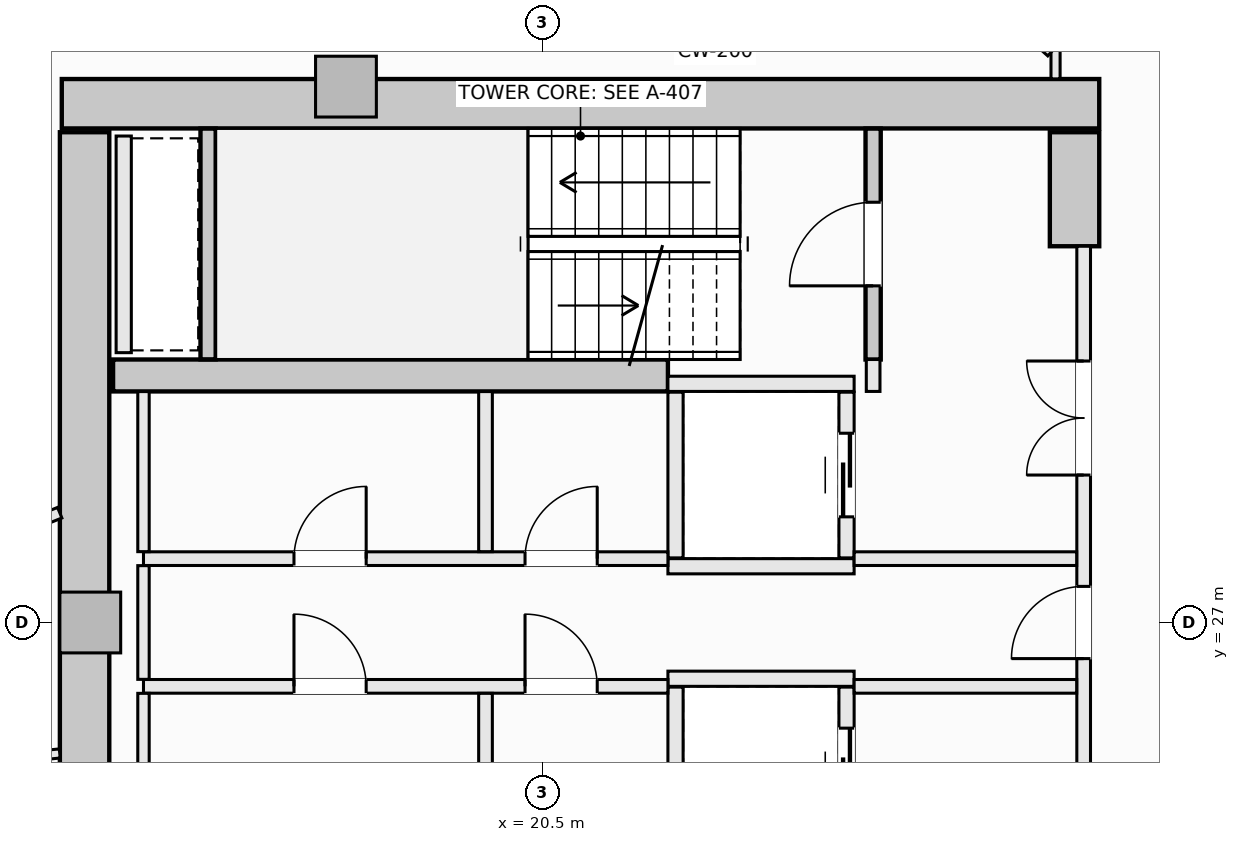
"""IFC4 building model, lengths in metres.
Left out: names, types, materials, properties, quantities, classifications, styles, units other than length and angle.
Written with IfcOpenShell. Run it as: python <this file> out.ifc"""

import sys

from ifc_helpers import new_model, si_unit, direction, frame, frame_2d, origin, origin_2d, place, context, subcontext, project, spatial, rectangle, extrude, element, fill, save


model = new_model("IFC4")
c1 = context("Model", 3, precision=1e-05, world=origin(), true_north=direction((0.0, 1.0)))
c2 = subcontext(c1, "Body", "Model", "MODEL_VIEW")
j1 = project(units=[si_unit("LENGTHUNIT", "METRE"), si_unit("PLANEANGLEUNIT", "RADIAN")], contexts=[c1])
p1 = place(None, origin())
s1 = spatial("IfcSite", under=j1, at=p1, CompositionType="ELEMENT")
p2 = place(p1, origin())
s2 = spatial("IfcBuilding", under=s1, at=p2, CompositionType="ELEMENT")
p3 = place(p2, frame((0.0, 0.0, 146.1)))
s3 = spatial("IfcBuildingStorey", under=s2, at=p3, CompositionType="ELEMENT", Elevation=146.1)
p4 = place(p3, frame((14.175, 33.825, -0.27), z_axis=(0.0, 0.0, 1.0), x_axis=(1.0, 0.0, 0.0)))
e1 = element("IfcWall", 1, at=p4, inside=s3, PredefinedType="SHEAR", context=c2, shape_type="SweptSolid", body=[
    extrude(rectangle(XDim=13.65, YDim=0.65, at=frame_2d((6.825, 0.0))), origin(), (0.0, 0.0, 1.0), 3.4),
])
p5 = place(p3, frame((14.475, 20.55, -0.27), z_axis=(0.0, 0.0, 1.0), x_axis=(0.0, 1.0, 0.0)))
e2 = element("IfcWall", 2, at=p5, inside=s3, PredefinedType="SHEAR", context=c2, shape_type="SweptSolid", body=[
    extrude(rectangle(XDim=12.9, YDim=0.65, at=frame_2d((6.45, 0.0))), origin(), (0.0, 0.0, 1.0), 3.4),
])
p6 = place(p3, frame((27.5, 31.95, -0.27), z_axis=(0.0, 0.0, 1.0), x_axis=(0.0, 1.0, 0.0)))
e3 = element("IfcWall", 3, at=p6, inside=s3, PredefinedType="SHEAR", context=c2, shape_type="SweptSolid", body=[
    extrude(rectangle(XDim=1.5, YDim=0.65, at=frame_2d((0.75, 0.0))), origin(), (0.0, 0.0, 1.0), 3.4),
])
p7 = place(p3, frame((14.85, 30.25, -0.27), z_axis=(0.0, 0.0, 1.0), x_axis=(1.0, 0.0, 0.0)))
e4 = element("IfcWall", 4, at=p7, inside=s3, PredefinedType="SHEAR", context=c2, shape_type="SweptSolid", body=[
    extrude(rectangle(XDim=7.3, YDim=0.42, at=frame_2d((3.65, 0.0))), origin(), (0.0, 0.0, 1.0), 3.4),
])
for number, where, z_axis, x_axis in (
    (5, (17.914, 34.05, -0.27), (0.0, 0.0, 1.0), (1.0, 0.0, 0.0)),
    (6, (14.55, 27.0, -0.27), (0.0, 0.0, 1.0), (1.0, 0.0, 0.0)),
):
    element("IfcColumn", number, at=place(p3, frame(where, z_axis=z_axis, x_axis=x_axis)), inside=s3, PredefinedType="PILASTER", context=c2, shape_type="SweptSolid", body=[
        extrude(rectangle(XDim=0.8, YDim=0.8, at=origin_2d()), origin(), (0.0, 0.0, 1.0), 3.4),
    ])
p8 = place(p3, frame((24.85, 30.46, -0.27), z_axis=(0.0, 0.0, 1.0), x_axis=(0.0, 1.0, 0.0)))
e7 = element("IfcWall", 7, at=p8, inside=s3, PredefinedType="SHEAR", context=c2, shape_type="SweptSolid", body=[
    extrude(rectangle(XDim=3.038, YDim=0.2, at=frame_2d((1.519, 0.0))), origin(), (0.0, 0.0, 1.0), 3.4),
])
p9 = place(p8, frame((0.969, 0.0, 0.27)))
e8 = element("IfcOpeningElement", 8, at=p9, cuts=e7, PredefinedType="OPENING", context=c2, shape_type="SweptSolid", body=[
    extrude(rectangle(XDim=1.1, YDim=2.15, at=frame_2d((0.55, 1.075))), frame((0.0, 0.11, 0.0), z_axis=(0.0, -1.0, 0.0), x_axis=(1.0, 0.0, 0.0)), (0.0, 0.0, 1.0), 0.22),
])
p10 = place(p3, frame((16.1, 30.462, -0.27), z_axis=(0.0, 0.0, 1.0), x_axis=(0.0, 1.0, 0.0)))
e9 = element("IfcWall", 9, at=p10, inside=s3, PredefinedType="SHEAR", context=c2, shape_type="SweptSolid", body=[
    extrude(rectangle(XDim=3.036, YDim=0.2, at=frame_2d((1.518, 0.0))), origin(), (0.0, 0.0, 1.0), 3.4),
])
for number, where, z_axis, x_axis in (
    (10, (22.15, 30.14, 0.0), (0.0, 0.0, 1.0), (1.0, 0.0, 0.0)),
    (11, (22.15, 27.74, 0.0), (0.0, 0.0, 1.0), (1.0, 0.0, 0.0)),
):
    element("IfcWall", number, at=place(p3, frame(where, z_axis=z_axis, x_axis=x_axis)), inside=s3, PredefinedType="SOLIDWALL", context=c2, shape_type="SweptSolid", body=[
        extrude(rectangle(XDim=2.45, YDim=0.2, at=frame_2d((1.225, 0.0))), origin(), (0.0, 0.0, 1.0), 3.13),
    ])
p11 = place(p3, frame((22.25, 27.85, 0.0), z_axis=(0.0, 0.0, 1.0), x_axis=(0.0, 1.0, 0.0)))
e12 = element("IfcWall", 12, at=p11, inside=s3, PredefinedType="SOLIDWALL", context=c2, shape_type="SweptSolid", body=[
    extrude(rectangle(XDim=2.18, YDim=0.2, at=frame_2d((1.09, 0.0))), origin(), (0.0, 0.0, 1.0), 3.13),
])
p12 = place(p3, frame((24.5, 27.85, 0.0), z_axis=(0.0, 0.0, 1.0), x_axis=(0.0, 1.0, 0.0)))
e13 = element("IfcWall", 13, at=p12, inside=s3, PredefinedType="SOLIDWALL", context=c2, shape_type="SweptSolid", body=[
    extrude(rectangle(XDim=2.18, YDim=0.2, at=frame_2d((1.09, 0.0))), origin(), (0.0, 0.0, 1.0), 3.13),
])
p13 = place(p12, frame((0.54, 0.0, 0.0)))
e14 = element("IfcOpeningElement", 14, at=p13, cuts=e13, PredefinedType="OPENING", context=c2, shape_type="SweptSolid", body=[
    extrude(rectangle(XDim=1.1, YDim=2.2, at=frame_2d((0.55, 1.1))), frame((0.0, 0.11, 0.0), z_axis=(0.0, -1.0, 0.0), x_axis=(1.0, 0.0, 0.0)), (0.0, 0.0, 1.0), 0.22),
])
p14 = place(p3, frame((22.15, 26.26, 0.0), z_axis=(0.0, 0.0, 1.0), x_axis=(1.0, 0.0, 0.0)))
e15 = element("IfcWall", 15, at=p14, inside=s3, PredefinedType="SOLIDWALL", context=c2, shape_type="SweptSolid", body=[
    extrude(rectangle(XDim=2.45, YDim=0.2, at=frame_2d((1.225, 0.0))), origin(), (0.0, 0.0, 1.0), 3.13),
])
p15 = place(p3, frame((22.25, 23.97, 0.0), z_axis=(0.0, 0.0, 1.0), x_axis=(0.0, 1.0, 0.0)))
e16 = element("IfcWall", 16, at=p15, inside=s3, PredefinedType="SOLIDWALL", context=c2, shape_type="SweptSolid", body=[
    extrude(rectangle(XDim=2.18, YDim=0.2, at=frame_2d((1.09, 0.0))), origin(), (0.0, 0.0, 1.0), 3.13),
])
p16 = place(p3, frame((24.5, 23.97, 0.0), z_axis=(0.0, 0.0, 1.0), x_axis=(0.0, 1.0, 0.0)))
e17 = element("IfcWall", 17, at=p16, inside=s3, PredefinedType="SOLIDWALL", context=c2, shape_type="SweptSolid", body=[
    extrude(rectangle(XDim=2.18, YDim=0.2, at=frame_2d((1.09, 0.0))), origin(), (0.0, 0.0, 1.0), 3.13),
])
p17 = place(p16, frame((0.54, 0.0, 0.0)))
e18 = element("IfcOpeningElement", 18, at=p17, cuts=e17, PredefinedType="OPENING", context=c2, shape_type="SweptSolid", body=[
    extrude(rectangle(XDim=1.1, YDim=2.2, at=frame_2d((0.55, 1.1))), frame((0.0, 0.11, 0.0), z_axis=(0.0, -1.0, 0.0), x_axis=(1.0, 0.0, 0.0)), (0.0, 0.0, 1.0), 0.22),
])
p18 = place(p3, frame((14.99, 30.55, 0.0), z_axis=(0.0, 0.0, 1.0), x_axis=(0.0, 1.0, 0.0)))
e19 = element("IfcWall", 19, at=p18, inside=s3, PredefinedType="SOLIDWALL", context=c2, shape_type="SweptSolid", body=[
    extrude(rectangle(XDim=2.85, YDim=0.2, at=frame_2d((1.425, 0.0))), origin(), (0.0, 0.0, 1.0), 3.13),
])
p19 = place(p3, frame((24.85, 30.04, 0.0), z_axis=(0.0, 0.0, 1.0), x_axis=(0.0, 1.0, 0.0)))
e20 = element("IfcWall", 20, at=p19, inside=s3, PredefinedType="SOLIDWALL", context=c2, shape_type="SweptSolid", body=[
    extrude(rectangle(XDim=0.42, YDim=0.18, at=frame_2d((0.21, 0.0))), origin(), (0.0, 0.0, 1.0), 3.13),
])
p20 = place(p3, frame((27.62, 22.05, 0.0), z_axis=(0.0, 0.0, 1.0), x_axis=(0.0, 1.0, 0.0)))
e21 = element("IfcWall", 21, at=p20, inside=s3, PredefinedType="SOLIDWALL", context=c2, shape_type="SweptSolid", body=[
    extrude(rectangle(XDim=9.9, YDim=0.18, at=frame_2d((4.95, 0.0))), origin(), (0.0, 0.0, 1.0), 3.13),
])
p21 = place(p20, frame((4.475, 0.0, 0.0)))
e22 = element("IfcOpeningElement", 22, at=p21, cuts=e21, PredefinedType="OPENING", context=c2, shape_type="SweptSolid", body=[
    extrude(rectangle(XDim=0.95, YDim=2.1, at=frame_2d((0.475, 1.05))), frame((0.0, 0.1, 0.0), z_axis=(0.0, -1.0, 0.0), x_axis=(1.0, 0.0, 0.0)), (0.0, 0.0, 1.0), 0.2),
])
p22 = place(p20, frame((6.89, 0.0, 0.0)))
e23 = element("IfcOpeningElement", 23, at=p22, cuts=e21, PredefinedType="OPENING", context=c2, shape_type="SweptSolid", body=[
    extrude(rectangle(XDim=1.5, YDim=2.2, at=frame_2d((0.75, 1.1))), frame((0.0, 0.1, 0.0), z_axis=(0.0, -1.0, 0.0), x_axis=(1.0, 0.0, 0.0)), (0.0, 0.0, 1.0), 0.2),
])
p23 = place(p20, frame((1.51, 0.0, 0.0)))
e24 = element("IfcOpeningElement", 24, at=p23, cuts=e21, PredefinedType="OPENING", context=c2, shape_type="SweptSolid", body=[
    extrude(rectangle(XDim=1.5, YDim=2.2, at=frame_2d((0.75, 1.1))), frame((0.0, 0.1, 0.0), z_axis=(0.0, -1.0, 0.0), x_axis=(1.0, 0.0, 0.0)), (0.0, 0.0, 1.0), 0.2),
])
p24 = place(p3, frame((15.25, 27.84, 0.0), z_axis=(0.0, 0.0, 1.0), x_axis=(1.0, 0.0, 0.0)))
e25 = element("IfcWall", 25, at=p24, inside=s3, PredefinedType="SOLIDWALL", context=c2, shape_type="SweptSolid", body=[
    extrude(rectangle(XDim=6.9, YDim=0.18, at=frame_2d((3.45, 0.0))), origin(), (0.0, 0.0, 1.0), 3.13),
])
p25 = place(p24, frame((5.02, 0.0, 0.0)))
e26 = element("IfcOpeningElement", 26, at=p25, cuts=e25, PredefinedType="OPENING", context=c2, shape_type="SweptSolid", body=[
    extrude(rectangle(XDim=0.95, YDim=2.1, at=frame_2d((0.475, 1.05))), frame((0.0, 0.1, 0.0), z_axis=(0.0, -1.0, 0.0), x_axis=(1.0, 0.0, 0.0)), (0.0, 0.0, 1.0), 0.2),
])
p26 = place(p24, frame((1.98, 0.0, 0.0)))
e27 = element("IfcOpeningElement", 27, at=p26, cuts=e25, PredefinedType="OPENING", context=c2, shape_type="SweptSolid", body=[
    extrude(rectangle(XDim=0.95, YDim=2.1, at=frame_2d((0.475, 1.05))), frame((0.0, 0.1, 0.0), z_axis=(0.0, -1.0, 0.0), x_axis=(1.0, 0.0, 0.0)), (0.0, 0.0, 1.0), 0.2),
])
p27 = place(p3, frame((24.6, 27.84, 0.0), z_axis=(0.0, 0.0, 1.0), x_axis=(1.0, 0.0, 0.0)))
e28 = element("IfcWall", 28, at=p27, inside=s3, PredefinedType="SOLIDWALL", context=c2, shape_type="SweptSolid", body=[
    extrude(rectangle(XDim=2.928, YDim=0.18, at=frame_2d((1.464, 0.0))), origin(), (0.0, 0.0, 1.0), 3.13),
])
p28 = place(p3, frame((15.25, 26.16, 0.0), z_axis=(0.0, 0.0, 1.0), x_axis=(1.0, 0.0, 0.0)))
e29 = element("IfcWall", 29, at=p28, inside=s3, PredefinedType="SOLIDWALL", context=c2, shape_type="SweptSolid", body=[
    extrude(rectangle(XDim=6.9, YDim=0.18, at=frame_2d((3.45, 0.0))), origin(), (0.0, 0.0, 1.0), 3.13),
])
p29 = place(p28, frame((5.02, 0.0, 0.0)))
e30 = element("IfcOpeningElement", 30, at=p29, cuts=e29, PredefinedType="OPENING", context=c2, shape_type="SweptSolid", body=[
    extrude(rectangle(XDim=0.95, YDim=2.1, at=frame_2d((0.475, 1.05))), frame((0.0, 0.1, 0.0), z_axis=(0.0, -1.0, 0.0), x_axis=(1.0, 0.0, 0.0)), (0.0, 0.0, 1.0), 0.2),
])
p30 = place(p28, frame((1.98, 0.0, 0.0)))
e31 = element("IfcOpeningElement", 31, at=p30, cuts=e29, PredefinedType="OPENING", context=c2, shape_type="SweptSolid", body=[
    extrude(rectangle(XDim=0.95, YDim=2.1, at=frame_2d((0.475, 1.05))), frame((0.0, 0.1, 0.0), z_axis=(0.0, -1.0, 0.0), x_axis=(1.0, 0.0, 0.0)), (0.0, 0.0, 1.0), 0.2),
])
p31 = place(p3, frame((24.6, 26.16, 0.0), z_axis=(0.0, 0.0, 1.0), x_axis=(1.0, 0.0, 0.0)))
e32 = element("IfcWall", 32, at=p31, inside=s3, PredefinedType="SOLIDWALL", context=c2, shape_type="SweptSolid", body=[
    extrude(rectangle(XDim=2.928, YDim=0.18, at=frame_2d((1.464, 0.0))), origin(), (0.0, 0.0, 1.0), 3.13),
])
p32 = place(p3, frame((15.25, 23.962, 0.0), z_axis=(0.0, 0.0, 1.0), x_axis=(0.0, 1.0, 0.0)))
e33 = element("IfcWall", 33, at=p32, inside=s3, PredefinedType="PARTITIONING", context=c2, shape_type="SweptSolid", body=[
    extrude(rectangle(XDim=2.106, YDim=0.15, at=frame_2d((1.053, 0.0))), origin(), (0.0, 0.0, 1.0), 3.13),
])
p33 = place(p3, frame((15.25, 26.252, 0.0), z_axis=(0.0, 0.0, 1.0), x_axis=(0.0, 1.0, 0.0)))
e34 = element("IfcWall", 34, at=p33, inside=s3, PredefinedType="PARTITIONING", context=c2, shape_type="SweptSolid", body=[
    extrude(rectangle(XDim=1.496, YDim=0.15, at=frame_2d((0.748, 0.0))), origin(), (0.0, 0.0, 1.0), 3.13),
])
p34 = place(p3, frame((15.25, 27.932, 0.0), z_axis=(0.0, 0.0, 1.0), x_axis=(0.0, 1.0, 0.0)))
e35 = element("IfcWall", 35, at=p34, inside=s3, PredefinedType="PARTITIONING", context=c2, shape_type="SweptSolid", body=[
    extrude(rectangle(XDim=2.106, YDim=0.15, at=frame_2d((1.053, 0.0))), origin(), (0.0, 0.0, 1.0), 3.13),
])
for number, where, z_axis, x_axis in (
    (36, (19.75, 23.962, 0.0), (0.0, 0.0, 1.0), (0.0, 1.0, 0.0)),
    (37, (19.75, 27.932, 0.0), (0.0, 0.0, 1.0), (0.0, 1.0, 0.0)),
):
    element("IfcWall", number, at=place(p3, frame(where, z_axis=z_axis, x_axis=x_axis)), inside=s3, PredefinedType="SOLIDWALL", context=c2, shape_type="SweptSolid", body=[
        extrude(rectangle(XDim=2.106, YDim=0.18, at=frame_2d((1.053, 0.0))), origin(), (0.0, 0.0, 1.0), 3.13),
    ])
p35 = place(p3, frame((27.25, 34.152, 0.0), z_axis=(0.0, 0.0, 1.0), x_axis=(0.0, 1.0, 0.0)))
e38 = element("IfcWall", 38, at=p35, inside=s3, PredefinedType="PARTITIONING", context=c2, shape_type="SweptSolid", body=[
    extrude(rectangle(XDim=0.806, YDim=0.12, at=frame_2d((0.403, 0.0))), origin(), (0.0, 0.0, 1.0), 3.13),
])
p36 = place(p3, frame((8.714, 24.735, 0.0), z_axis=(0.0, 0.0, 1.0), x_axis=(0.995066803819, 0.099207136527, 0.0)))
e39 = element("IfcWall", 39, at=p36, inside=s3, PredefinedType="PARTITIONING", context=c2, shape_type="SweptSolid", body=[
    extrude(rectangle(XDim=5.461, YDim=0.12, at=frame_2d((2.73, 0.0))), origin(), (0.0, 0.0, 1.0), 3.13),
])
p37 = place(p3, frame((8.479, 26.162, 0.0), z_axis=(0.0, 0.0, 1.0), x_axis=(0.927622844305, 0.373518217392, 0.0)))
e40 = element("IfcWall", 40, at=p37, inside=s3, PredefinedType="PARTITIONING", context=c2, shape_type="SweptSolid", body=[
    extrude(rectangle(XDim=6.111, YDim=0.15, at=frame_2d((3.055, 0.0))), origin(), (0.0, 0.0, 1.0), 2.505),
])
p38 = place(p3, frame((26.678, 34.958, 0.0), z_axis=(0.0, 0.0, 1.0), x_axis=(0.742975583244, -0.669318521112, 0.0)))
e41 = element("IfcWall", 41, at=p38, inside=s3, PredefinedType="PARTITIONING", context=c2, shape_type="SweptSolid", body=[
    extrude(rectangle(XDim=0.686, YDim=0.12, at=frame_2d((0.343, 0.0))), origin(), (0.0, 0.0, 1.0), 3.13),
])
p39 = place(p9, origin())
e42 = element("IfcDoor", 42, at=p39, inside=s3, OperationType="SINGLE_SWING_LEFT", PredefinedType="DOOR", context=c2, shape_type="SweptSolid", body=[
    extrude(rectangle(XDim=1.1, YDim=2.15, at=frame_2d((0.55, 1.075))), frame((0.0, 0.025, 0.0), z_axis=(0.0, -1.0, 0.0), x_axis=(1.0, 0.0, 0.0)), (0.0, 0.0, 1.0), 0.05),
])
fill(e8, e42)
p40 = place(p13, origin())
e43 = element("IfcDoor", 43, at=p40, inside=s3, OperationType="SLIDING_TO_LEFT", PredefinedType="DOOR", context=c2, shape_type="SweptSolid", body=[
    extrude(rectangle(XDim=1.1, YDim=2.2, at=frame_2d((0.55, 1.1))), frame((0.0, 0.025, 0.0), z_axis=(0.0, -1.0, 0.0), x_axis=(1.0, 0.0, 0.0)), (0.0, 0.0, 1.0), 0.05),
])
fill(e14, e43)
p41 = place(p17, origin())
e44 = element("IfcDoor", 44, at=p41, inside=s3, OperationType="SLIDING_TO_LEFT", PredefinedType="DOOR", context=c2, shape_type="SweptSolid", body=[
    extrude(rectangle(XDim=1.1, YDim=2.2, at=frame_2d((0.55, 1.1))), frame((0.0, 0.025, 0.0), z_axis=(0.0, -1.0, 0.0), x_axis=(1.0, 0.0, 0.0)), (0.0, 0.0, 1.0), 0.05),
])
fill(e18, e44)
p42 = place(p21, origin())
e45 = element("IfcDoor", 45, at=p42, inside=s3, OperationType="SINGLE_SWING_LEFT", PredefinedType="DOOR", context=c2, shape_type="SweptSolid", body=[
    extrude(rectangle(XDim=0.95, YDim=2.1, at=frame_2d((0.475, 1.05))), frame((0.0, 0.025, 0.0), z_axis=(0.0, -1.0, 0.0), x_axis=(1.0, 0.0, 0.0)), (0.0, 0.0, 1.0), 0.05),
])
fill(e22, e45)
p43 = place(p22, origin())
e46 = element("IfcDoor", 46, at=p43, inside=s3, OperationType="DOUBLE_DOOR_SINGLE_SWING", PredefinedType="DOOR", context=c2, shape_type="SweptSolid", body=[
    extrude(rectangle(XDim=1.5, YDim=2.2, at=frame_2d((0.75, 1.1))), frame((0.0, 0.025, 0.0), z_axis=(0.0, -1.0, 0.0), x_axis=(1.0, 0.0, 0.0)), (0.0, 0.0, 1.0), 0.05),
])
fill(e23, e46)
p44 = place(p25, origin())
e47 = element("IfcDoor", 47, at=p44, inside=s3, OperationType="SINGLE_SWING_RIGHT", PredefinedType="DOOR", context=c2, shape_type="SweptSolid", body=[
    extrude(rectangle(XDim=0.95, YDim=2.1, at=frame_2d((0.475, 1.05))), frame((0.0, 0.025, 0.0), z_axis=(0.0, -1.0, 0.0), x_axis=(1.0, 0.0, 0.0)), (0.0, 0.0, 1.0), 0.05),
])
fill(e26, e47)
p45 = place(p29, origin())
e48 = element("IfcDoor", 48, at=p45, inside=s3, OperationType="SINGLE_SWING_LEFT", PredefinedType="DOOR", context=c2, shape_type="SweptSolid", body=[
    extrude(rectangle(XDim=0.95, YDim=2.1, at=frame_2d((0.475, 1.05))), frame((0.0, 0.025, 0.0), z_axis=(0.0, -1.0, 0.0), x_axis=(1.0, 0.0, 0.0)), (0.0, 0.0, 1.0), 0.05),
])
fill(e30, e48)
p46 = place(p26, origin())
e49 = element("IfcDoor", 49, at=p46, inside=s3, OperationType="SINGLE_SWING_RIGHT", PredefinedType="DOOR", context=c2, shape_type="SweptSolid", body=[
    extrude(rectangle(XDim=0.95, YDim=2.1, at=frame_2d((0.475, 1.05))), frame((0.0, 0.025, 0.0), z_axis=(0.0, -1.0, 0.0), x_axis=(1.0, 0.0, 0.0)), (0.0, 0.0, 1.0), 0.05),
])
fill(e27, e49)
p47 = place(p30, origin())
e50 = element("IfcDoor", 50, at=p47, inside=s3, OperationType="SINGLE_SWING_LEFT", PredefinedType="DOOR", context=c2, shape_type="SweptSolid", body=[
    extrude(rectangle(XDim=0.95, YDim=2.1, at=frame_2d((0.475, 1.05))), frame((0.0, 0.025, 0.0), z_axis=(0.0, -1.0, 0.0), x_axis=(1.0, 0.0, 0.0)), (0.0, 0.0, 1.0), 0.05),
])
fill(e31, e50)
save(model, sys.argv[1])
